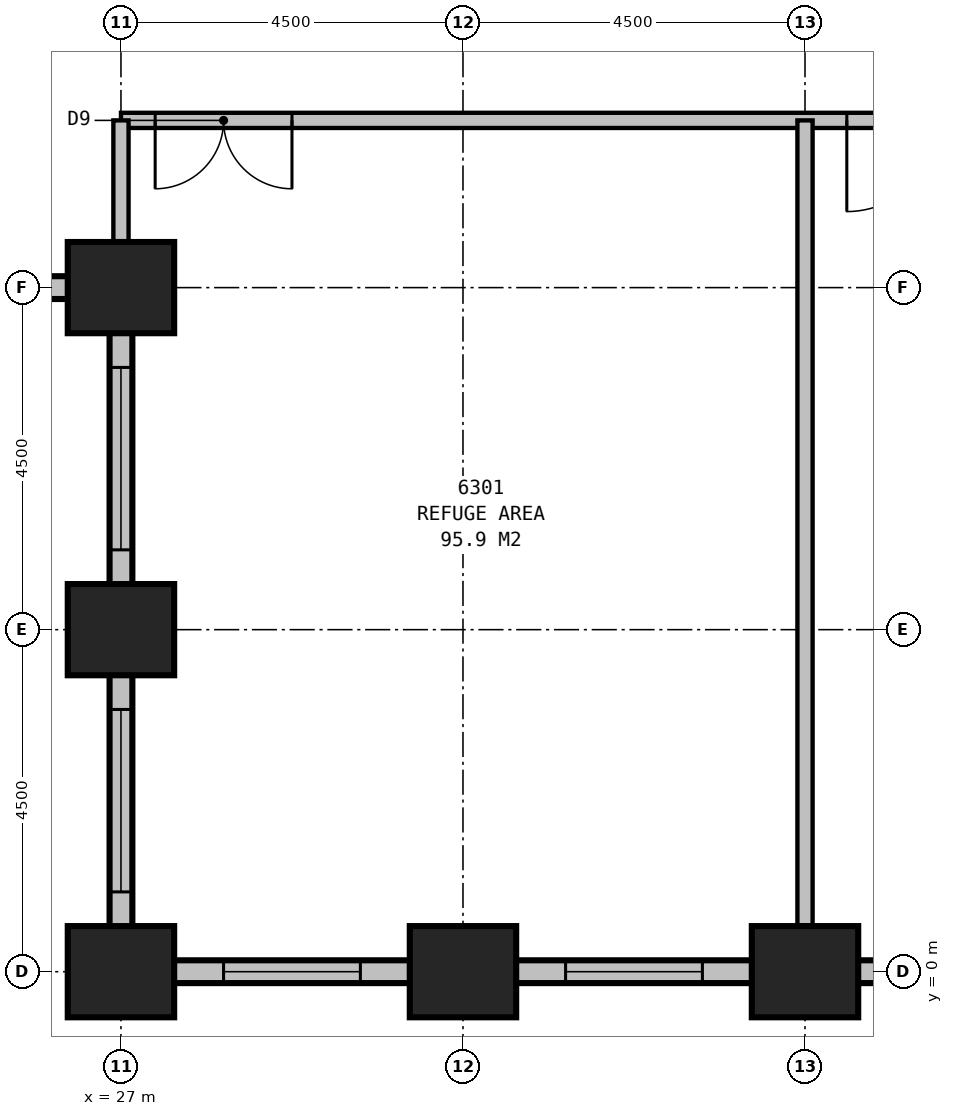
"""IFC4 building model, lengths in metres.
Left out: names, types, materials, properties, quantities, classifications, styles, units other than length and angle.
Written with IfcOpenShell. Run it as: python <this file> out.ifc"""

import sys

from ifc_helpers import new_model, si_unit, direction, frame, frame_2d, origin, origin_2d, place, context, subcontext, project, spatial, rectangle, extrude, element, fill, save


model = new_model("IFC4")
c1 = context("Model", 3, precision=1e-05, world=origin(), true_north=direction((0.0, 1.0)))
c2 = subcontext(c1, "Body", "Model", "MODEL_VIEW")
j1 = project(units=[si_unit("LENGTHUNIT", "METRE"), si_unit("PLANEANGLEUNIT", "RADIAN")], contexts=[c1])
p1 = place(None, origin())
s1 = spatial("IfcSite", under=j1, at=p1, CompositionType="ELEMENT")
p2 = place(p1, origin())
s2 = spatial("IfcBuilding", under=s1, at=p2, CompositionType="ELEMENT")
p3 = place(p2, frame((0.0, 0.0, 244.7)))
s3 = spatial("IfcBuildingStorey", under=s2, at=p3, CompositionType="ELEMENT", Elevation=244.7)
for number, where, z_axis, x_axis in (
    (1, (27.0, 9.0, 0.0), (0.0, 0.0, 1.0), (1.0, 0.0, 0.0)),
    (2, (27.0, 4.5, 0.0), (0.0, 0.0, 1.0), (1.0, 0.0, 0.0)),
    (3, (27.0, 0.0, 0.0), (0.0, 0.0, 1.0), (1.0, 0.0, 0.0)),
    (4, (31.5, 0.0, 0.0), (0.0, 0.0, 1.0), (1.0, 0.0, 0.0)),
    (5, (36.0, 0.0, 0.0), (0.0, 0.0, 1.0), (1.0, 0.0, 0.0)),
):
    element("IfcColumn", number, at=place(p3, frame(where, z_axis=z_axis, x_axis=x_axis)), inside=s3, PredefinedType="COLUMN", context=c2, shape_type="SweptSolid", body=[
        extrude(rectangle(XDim=1.4, YDim=1.2, at=origin_2d()), origin(), (0.0, 0.0, 1.0), 6.0),
    ])
p4 = place(p3, frame((9.85, 9.0, 0.0), z_axis=(0.0, 0.0, 1.0), x_axis=(1.0, 0.0, 0.0)))
e6 = element("IfcWall", 6, at=p4, inside=s3, PredefinedType="STANDARD", context=c2, shape_type="SweptSolid", body=[
    extrude(rectangle(XDim=17.3, YDim=0.3, at=frame_2d((8.65, 0.0))), origin(), (0.0, 0.0, 1.0), 4.45),
])
p5 = place(p4, frame((1.0, 0.0, 0.5)))
e7 = element("IfcOpeningElement", 7, at=p5, cuts=e6, PredefinedType="OPENING", context=c2, shape_type="SweptSolid", body=[
    extrude(rectangle(XDim=1.8, YDim=2.0, at=frame_2d((0.9, 1.0))), frame((0.0, 0.16, 0.0), z_axis=(0.0, -1.0, 0.0), x_axis=(1.0, 0.0, 0.0)), (0.0, 0.0, 1.0), 0.32),
])
p6 = place(p4, frame((4.7, 0.0, 0.5)))
e8 = element("IfcOpeningElement", 8, at=p6, cuts=e6, PredefinedType="OPENING", context=c2, shape_type="SweptSolid", body=[
    extrude(rectangle(XDim=2.4, YDim=2.0, at=frame_2d((1.2, 1.0))), frame((0.0, 0.16, 0.0), z_axis=(0.0, -1.0, 0.0), x_axis=(1.0, 0.0, 0.0)), (0.0, 0.0, 1.0), 0.32),
])
p7 = place(p4, frame((9.2, 0.0, 0.5)))
e9 = element("IfcOpeningElement", 9, at=p7, cuts=e6, PredefinedType="OPENING", context=c2, shape_type="SweptSolid", body=[
    extrude(rectangle(XDim=2.4, YDim=2.0, at=frame_2d((1.2, 1.0))), frame((0.0, 0.16, 0.0), z_axis=(0.0, -1.0, 0.0), x_axis=(1.0, 0.0, 0.0)), (0.0, 0.0, 1.0), 0.32),
])
p8 = place(p4, frame((13.7, 0.0, 0.5)))
e10 = element("IfcOpeningElement", 10, at=p8, cuts=e6, PredefinedType="OPENING", context=c2, shape_type="SweptSolid", body=[
    extrude(rectangle(XDim=2.4, YDim=2.0, at=frame_2d((1.2, 1.0))), frame((0.0, 0.16, 0.0), z_axis=(0.0, -1.0, 0.0), x_axis=(1.0, 0.0, 0.0)), (0.0, 0.0, 1.0), 0.32),
])
p9 = place(p3, frame((27.0, 9.15, 0.0), z_axis=(0.0, 0.0, 1.0), x_axis=(0.0, -1.0, 0.0)))
e11 = element("IfcWall", 11, at=p9, inside=s3, PredefinedType="STANDARD", context=c2, shape_type="SweptSolid", body=[
    extrude(rectangle(XDim=9.3, YDim=0.3, at=frame_2d((4.65, 0.0))), origin(), (0.0, 0.0, 1.0), 4.45),
])
p10 = place(p9, frame((1.2, 0.0, 0.5)))
e12 = element("IfcOpeningElement", 12, at=p10, cuts=e11, PredefinedType="OPENING", context=c2, shape_type="SweptSolid", body=[
    extrude(rectangle(XDim=2.4, YDim=2.0, at=frame_2d((1.2, 1.0))), frame((0.0, 0.16, 0.0), z_axis=(0.0, -1.0, 0.0), x_axis=(1.0, 0.0, 0.0)), (0.0, 0.0, 1.0), 0.32),
])
p11 = place(p9, frame((5.7, 0.0, 0.5)))
e13 = element("IfcOpeningElement", 13, at=p11, cuts=e11, PredefinedType="OPENING", context=c2, shape_type="SweptSolid", body=[
    extrude(rectangle(XDim=2.4, YDim=2.0, at=frame_2d((1.2, 1.0))), frame((0.0, 0.16, 0.0), z_axis=(0.0, -1.0, 0.0), x_axis=(1.0, 0.0, 0.0)), (0.0, 0.0, 1.0), 0.32),
])
p12 = place(p3, frame((26.85, 0.0, 0.0), z_axis=(0.0, 0.0, 1.0), x_axis=(1.0, 0.0, 0.0)))
e14 = element("IfcWall", 14, at=p12, inside=s3, PredefinedType="STANDARD", context=c2, shape_type="SweptSolid", body=[
    extrude(rectangle(XDim=18.3, YDim=0.3, at=frame_2d((9.15, 0.0))), origin(), (0.0, 0.0, 1.0), 4.45),
])
p13 = place(p12, frame((1.5, 0.0, 0.5)))
e15 = element("IfcOpeningElement", 15, at=p13, cuts=e14, PredefinedType="OPENING", context=c2, shape_type="SweptSolid", body=[
    extrude(rectangle(XDim=1.8, YDim=2.0, at=frame_2d((0.9, 1.0))), frame((0.0, 0.16, 0.0), z_axis=(0.0, -1.0, 0.0), x_axis=(1.0, 0.0, 0.0)), (0.0, 0.0, 1.0), 0.32),
])
p14 = place(p12, frame((6.0, 0.0, 0.5)))
e16 = element("IfcOpeningElement", 16, at=p14, cuts=e14, PredefinedType="OPENING", context=c2, shape_type="SweptSolid", body=[
    extrude(rectangle(XDim=1.8, YDim=2.0, at=frame_2d((0.9, 1.0))), frame((0.0, 0.16, 0.0), z_axis=(0.0, -1.0, 0.0), x_axis=(1.0, 0.0, 0.0)), (0.0, 0.0, 1.0), 0.32),
])
p15 = place(p12, frame((10.5, 0.0, 0.5)))
e17 = element("IfcOpeningElement", 17, at=p15, cuts=e14, PredefinedType="OPENING", context=c2, shape_type="SweptSolid", body=[
    extrude(rectangle(XDim=1.8, YDim=2.0, at=frame_2d((0.9, 1.0))), frame((0.0, 0.16, 0.0), z_axis=(0.0, -1.0, 0.0), x_axis=(1.0, 0.0, 0.0)), (0.0, 0.0, 1.0), 0.32),
])
p16 = place(p12, frame((14.7, 0.0, 0.5)))
e18 = element("IfcOpeningElement", 18, at=p16, cuts=e14, PredefinedType="OPENING", context=c2, shape_type="SweptSolid", body=[
    extrude(rectangle(XDim=2.4, YDim=2.0, at=frame_2d((1.2, 1.0))), frame((0.0, 0.16, 0.0), z_axis=(0.0, -1.0, 0.0), x_axis=(1.0, 0.0, 0.0)), (0.0, 0.0, 1.0), 0.32),
])
p17 = place(p3, frame((27.0, 11.2, 0.0), z_axis=(0.0, 0.0, 1.0), x_axis=(1.0, 0.0, 0.0)))
e19 = element("IfcWall", 19, at=p17, inside=s3, PredefinedType="PARTITIONING", context=c2, shape_type="SweptSolid", body=[
    extrude(rectangle(XDim=11.3, YDim=0.2, at=frame_2d((5.65, 0.0))), origin(), (0.0, 0.0, 1.0), 5.75),
])
p18 = place(p17, frame((2.25, 0.0, 0.0), z_axis=(0.0, 0.0, 1.0), x_axis=(-1.0, 0.0, 0.0)))
e20 = element("IfcOpeningElement", 20, at=p18, cuts=e19, PredefinedType="OPENING", context=c2, shape_type="SweptSolid", body=[
    extrude(rectangle(XDim=1.8, YDim=2.4, at=frame_2d((0.9, 1.2))), frame((0.0, 0.11, 0.0), z_axis=(0.0, -1.0, 0.0), x_axis=(1.0, 0.0, 0.0)), (0.0, 0.0, 1.0), 0.22),
])
p19 = place(p17, frame((10.75, 0.0, 0.0), z_axis=(0.0, 0.0, 1.0), x_axis=(-1.0, 0.0, 0.0)))
e21 = element("IfcOpeningElement", 21, at=p19, cuts=e19, PredefinedType="OPENING", context=c2, shape_type="SweptSolid", body=[
    extrude(rectangle(XDim=1.2, YDim=2.1, at=frame_2d((0.6, 1.05))), frame((0.0, 0.11, 0.0), z_axis=(0.0, -1.0, 0.0), x_axis=(1.0, 0.0, 0.0)), (0.0, 0.0, 1.0), 0.22),
])
p20 = place(p3, frame((27.0, 11.2, 0.0), z_axis=(0.0, 0.0, 1.0), x_axis=(0.0, -1.0, 0.0)))
e22 = element("IfcWall", 22, at=p20, inside=s3, PredefinedType="PARTITIONING", context=c2, shape_type="SweptSolid", body=[
    extrude(rectangle(XDim=1.59, YDim=0.2, at=frame_2d((0.795, 0.0))), origin(), (0.0, 0.0, 1.0), 4.75),
])
p21 = place(p3, frame((36.0, 11.2, 0.0), z_axis=(0.0, 0.0, 1.0), x_axis=(0.0, -1.0, 0.0)))
e23 = element("IfcWall", 23, at=p21, inside=s3, PredefinedType="PARTITIONING", context=c2, shape_type="SweptSolid", body=[
    extrude(rectangle(XDim=10.59, YDim=0.2, at=frame_2d((5.295, 0.0))), origin(), (0.0, 0.0, 1.0), 2.15),
])
p22 = place(p10, origin())
e24 = element("IfcWindow", 24, at=p22, inside=s3, PartitioningType="SINGLE_PANEL", PredefinedType="USERDEFINED", context=c2, shape_type="SweptSolid", body=[
    extrude(rectangle(XDim=2.4, YDim=2.0, at=frame_2d((1.2, 1.0))), frame((0.0, 0.03, 0.0), z_axis=(0.0, -1.0, 0.0), x_axis=(1.0, 0.0, 0.0)), (0.0, 0.0, 1.0), 0.06),
])
fill(e12, e24)
p23 = place(p11, origin())
e25 = element("IfcWindow", 25, at=p23, inside=s3, PartitioningType="SINGLE_PANEL", PredefinedType="USERDEFINED", context=c2, shape_type="SweptSolid", body=[
    extrude(rectangle(XDim=2.4, YDim=2.0, at=frame_2d((1.2, 1.0))), frame((0.0, 0.03, 0.0), z_axis=(0.0, -1.0, 0.0), x_axis=(1.0, 0.0, 0.0)), (0.0, 0.0, 1.0), 0.06),
])
fill(e13, e25)
p24 = place(p13, origin())
e26 = element("IfcWindow", 26, at=p24, inside=s3, PartitioningType="SINGLE_PANEL", PredefinedType="USERDEFINED", context=c2, shape_type="SweptSolid", body=[
    extrude(rectangle(XDim=1.8, YDim=2.0, at=frame_2d((0.9, 1.0))), frame((0.0, 0.03, 0.0), z_axis=(0.0, -1.0, 0.0), x_axis=(1.0, 0.0, 0.0)), (0.0, 0.0, 1.0), 0.06),
])
fill(e15, e26)
p25 = place(p14, origin())
e27 = element("IfcWindow", 27, at=p25, inside=s3, PartitioningType="SINGLE_PANEL", PredefinedType="USERDEFINED", context=c2, shape_type="SweptSolid", body=[
    extrude(rectangle(XDim=1.8, YDim=2.0, at=frame_2d((0.9, 1.0))), frame((0.0, 0.03, 0.0), z_axis=(0.0, -1.0, 0.0), x_axis=(1.0, 0.0, 0.0)), (0.0, 0.0, 1.0), 0.06),
])
fill(e16, e27)
p26 = place(p18, origin())
e28 = element("IfcDoor", 28, at=p26, inside=s3, OperationType="DOUBLE_DOOR_SINGLE_SWING", PredefinedType="DOOR", context=c2, shape_type="SweptSolid", body=[
    extrude(rectangle(XDim=1.8, YDim=2.4, at=frame_2d((0.9, 1.2))), frame((0.0, 0.025, 0.0), z_axis=(0.0, -1.0, 0.0), x_axis=(1.0, 0.0, 0.0)), (0.0, 0.0, 1.0), 0.05),
])
fill(e20, e28)
p27 = place(p19, origin())
e29 = element("IfcDoor", 29, at=p27, inside=s3, OperationType="SINGLE_SWING_RIGHT", PredefinedType="DOOR", context=c2, shape_type="SweptSolid", body=[
    extrude(rectangle(XDim=1.2, YDim=2.1, at=frame_2d((0.6, 1.05))), frame((0.0, 0.025, 0.0), z_axis=(0.0, -1.0, 0.0), x_axis=(1.0, 0.0, 0.0)), (0.0, 0.0, 1.0), 0.05),
])
fill(e21, e29)
save(model, sys.argv[1])
